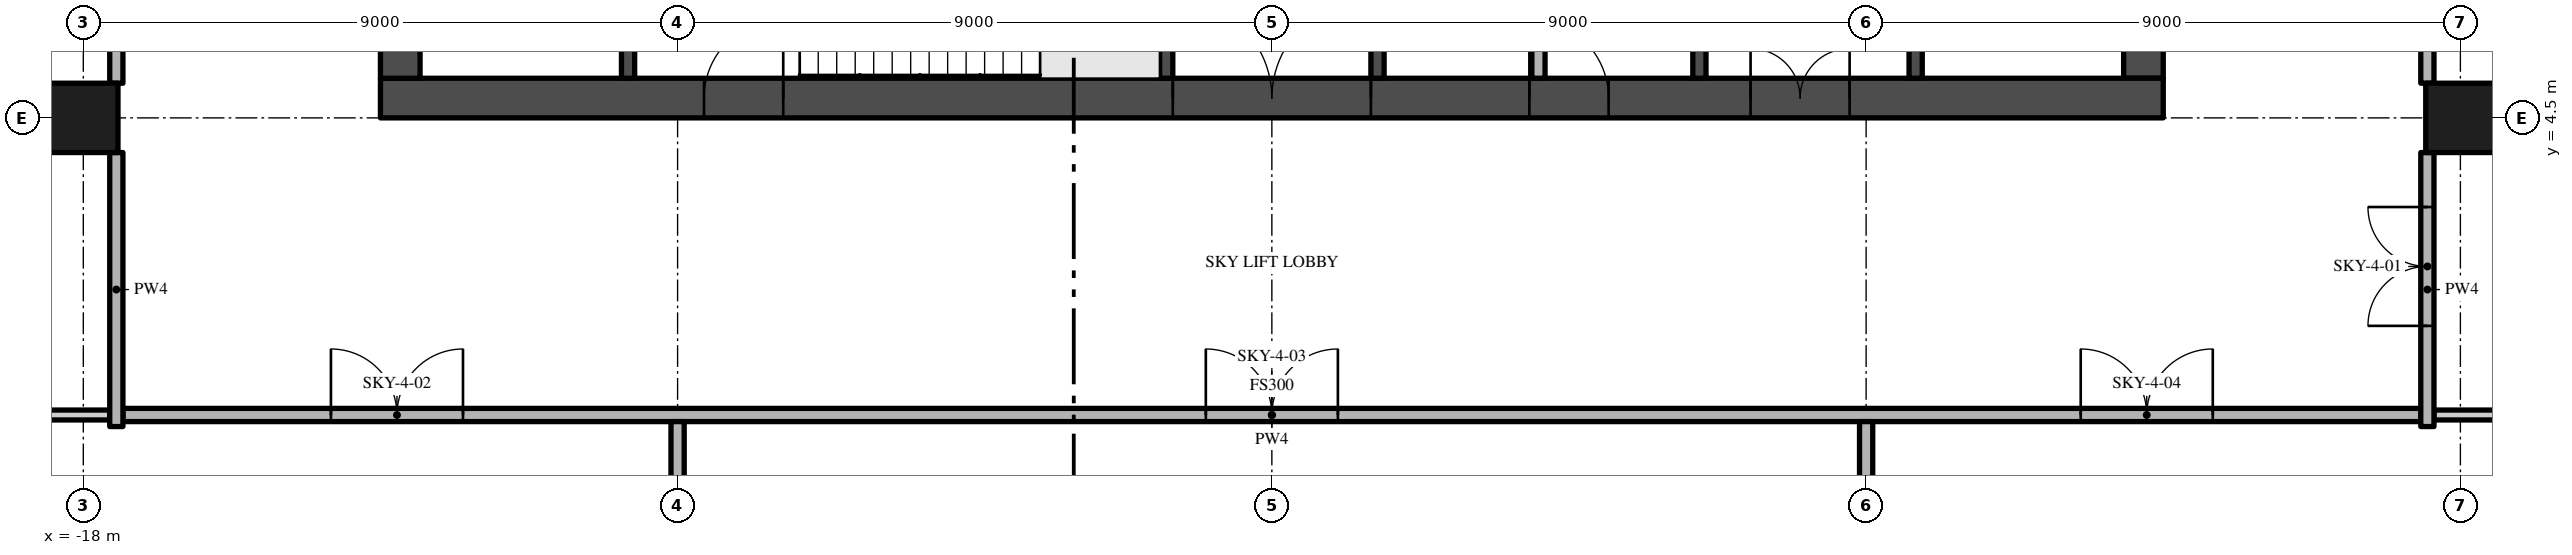
"""IFC4 building model, lengths in metres.
Left out: names, types, materials, properties, quantities, classifications, styles, units other than length and angle.
Written with IfcOpenShell. Run it as: python <this file> out.ifc"""

import sys

from ifc_helpers import new_model, si_unit, direction, frame, frame_2d, origin, origin_2d, place, context, subcontext, project, spatial, rectangle, extrude, element, fill, save


model = new_model("IFC4")
c1 = context("Model", 3, precision=1e-05, world=origin(), true_north=direction((0.0, 1.0)))
c2 = subcontext(c1, "Body", "Model", "MODEL_VIEW")
j1 = project(units=[si_unit("LENGTHUNIT", "METRE"), si_unit("PLANEANGLEUNIT", "RADIAN")], contexts=[c1])
p1 = place(None, origin())
s1 = spatial("IfcSite", under=j1, at=p1, CompositionType="ELEMENT")
p2 = place(p1, origin())
s2 = spatial("IfcBuilding", under=s1, at=p2, CompositionType="ELEMENT")
p3 = place(p2, frame((0.0, 0.0, 233.8)))
s3 = spatial("IfcBuildingStorey", under=s2, at=p3, CompositionType="ELEMENT", Elevation=233.8)
p4 = place(p3, frame((-13.5, 4.8, -0.3), z_axis=(0.0, 0.0, 1.0), x_axis=(1.0, 0.0, 0.0)))
e1 = element("IfcWall", 1, at=p4, inside=s3, PredefinedType="SHEAR", context=c2, shape_type="SweptSolid", body=[
    extrude(rectangle(XDim=27.0, YDim=0.6, at=frame_2d((13.5, 0.0))), origin(), (0.0, 0.0, 1.0), 5.0),
])
p5 = place(p4, frame((12.0, 0.0, 0.3)))
e2 = element("IfcOpeningElement", 2, at=p5, cuts=e1, PredefinedType="OPENING", context=c2, shape_type="SweptSolid", body=[
    extrude(rectangle(XDim=3.0, YDim=2.4, at=frame_2d((1.5, 1.2))), frame((0.0, 0.31, 0.0), z_axis=(0.0, -1.0, 0.0), x_axis=(1.0, 0.0, 0.0)), (0.0, 0.0, 1.0), 0.62),
])
p6 = place(p4, frame((4.9, 0.0, 0.3)))
e3 = element("IfcOpeningElement", 3, at=p6, cuts=e1, PredefinedType="OPENING", context=c2, shape_type="SweptSolid", body=[
    extrude(rectangle(XDim=1.2, YDim=2.2, at=frame_2d((0.6, 1.1))), frame((0.0, 0.31, 0.0), z_axis=(0.0, -1.0, 0.0), x_axis=(1.0, 0.0, 0.0)), (0.0, 0.0, 1.0), 0.62),
])
p7 = place(p4, frame((20.75, 0.0, 0.3)))
e4 = element("IfcOpeningElement", 4, at=p7, cuts=e1, PredefinedType="OPENING", context=c2, shape_type="SweptSolid", body=[
    extrude(rectangle(XDim=1.5, YDim=2.2, at=frame_2d((0.75, 1.1))), frame((0.0, 0.31, 0.0), z_axis=(0.0, -1.0, 0.0), x_axis=(1.0, 0.0, 0.0)), (0.0, 0.0, 1.0), 0.62),
])
p8 = place(p4, frame((17.4, 0.0, 0.3)))
e5 = element("IfcOpeningElement", 5, at=p8, cuts=e1, PredefinedType="OPENING", context=c2, shape_type="SweptSolid", body=[
    extrude(rectangle(XDim=1.2, YDim=2.2, at=frame_2d((0.6, 1.1))), frame((0.0, 0.31, 0.0), z_axis=(0.0, -1.0, 0.0), x_axis=(1.0, 0.0, 0.0)), (0.0, 0.0, 1.0), 0.62),
])
p9 = place(p3, frame((13.2, 5.1, -0.3), z_axis=(0.0, 0.0, 1.0), x_axis=(0.0, 1.0, 0.0)))
e6 = element("IfcWall", 6, at=p9, inside=s3, PredefinedType="SHEAR", context=c2, shape_type="SweptSolid", body=[
    extrude(rectangle(XDim=16.8, YDim=0.6, at=frame_2d((8.4, 0.0))), origin(), (0.0, 0.0, 1.0), 5.0),
])
p10 = place(p9, frame((6.3, 0.0, 0.3)))
e7 = element("IfcOpeningElement", 7, at=p10, cuts=e6, PredefinedType="OPENING", context=c2, shape_type="SweptSolid", body=[
    extrude(rectangle(XDim=1.2, YDim=2.2, at=frame_2d((0.6, 1.1))), frame((0.0, 0.31, 0.0), z_axis=(0.0, -1.0, 0.0), x_axis=(1.0, 0.0, 0.0)), (0.0, 0.0, 1.0), 0.62),
])
p11 = place(p3, frame((-13.2, 21.9, -0.3), z_axis=(0.0, 0.0, 1.0), x_axis=(0.0, -1.0, 0.0)))
e8 = element("IfcWall", 8, at=p11, inside=s3, PredefinedType="SHEAR", context=c2, shape_type="SweptSolid", body=[
    extrude(rectangle(XDim=16.8, YDim=0.6, at=frame_2d((8.4, 0.0))), origin(), (0.0, 0.0, 1.0), 5.0),
])
p12 = place(p11, frame((9.3, 0.0, 0.3)))
e9 = element("IfcOpeningElement", 9, at=p12, cuts=e8, PredefinedType="OPENING", context=c2, shape_type="SweptSolid", body=[
    extrude(rectangle(XDim=1.2, YDim=2.2, at=frame_2d((0.6, 1.1))), frame((0.0, 0.31, 0.0), z_axis=(0.0, -1.0, 0.0), x_axis=(1.0, 0.0, 0.0)), (0.0, 0.0, 1.0), 0.62),
])
for number, where, z_axis, x_axis in (
    (10, (-18.0, 4.5, 0.0), (0.0, 0.0, 1.0), (1.0, 0.0, 0.0)),
    (11, (18.0, 4.5, 0.0), (0.0, 0.0, 1.0), (1.0, 0.0, 0.0)),
):
    element("IfcColumn", number, at=place(p3, frame(where, z_axis=z_axis, x_axis=x_axis)), inside=s3, PredefinedType="COLUMN", context=c2, shape_type="SweptSolid", body=[
        extrude(rectangle(XDim=1.05, YDim=1.05, at=origin_2d()), origin(), (0.0, 0.0, 1.0), 4.7),
    ])
for number, where, z_axis, x_axis in (
    (12, (-9.75, 5.1, 0.0), (0.0, 0.0, 1.0), (0.0, 1.0, 0.0)),
    (13, (-1.6, 5.1, 0.0), (0.0, 0.0, 1.0), (0.0, 1.0, 0.0)),
):
    element("IfcWall", number, at=place(p3, frame(where, z_axis=z_axis, x_axis=x_axis)), inside=s3, PredefinedType="SHEAR", context=c2, shape_type="SweptSolid", body=[
        extrude(rectangle(XDim=2.85, YDim=0.2, at=frame_2d((1.425, 0.0))), origin(), (0.0, 0.0, 1.0), 4.7),
    ])
p13 = place(p3, frame((1.6, 9.8, 0.0), z_axis=(0.0, 0.0, 1.0), x_axis=(0.0, -1.0, 0.0)))
e14 = element("IfcWall", 14, at=p13, inside=s3, PredefinedType="SHEAR", context=c2, shape_type="SweptSolid", body=[
    extrude(rectangle(XDim=4.7, YDim=0.2, at=frame_2d((2.35, 0.0))), origin(), (0.0, 0.0, 1.0), 4.7),
])
p14 = place(p13, frame((1.5, 0.0, 0.0)))
e15 = element("IfcOpeningElement", 15, at=p14, cuts=e14, PredefinedType="OPENING", context=c2, shape_type="SweptSolid", body=[
    extrude(rectangle(XDim=0.9, YDim=2.1, at=frame_2d((0.45, 1.05))), frame((0.0, 0.11, 0.0), z_axis=(0.0, -1.0, 0.0), x_axis=(1.0, 0.0, 0.0)), (0.0, 0.0, 1.0), 0.22),
])
p15 = place(p3, frame((4.037, 9.8, 0.0), z_axis=(0.0, 0.0, 1.0), x_axis=(0.0, -1.0, 0.0)))
e16 = element("IfcWall", 16, at=p15, inside=s3, PredefinedType="PARTITIONING", context=c2, shape_type="SweptSolid", body=[
    extrude(rectangle(XDim=4.7, YDim=0.2, at=frame_2d((2.35, 0.0))), origin(), (0.0, 0.0, 1.0), 4.7),
])
p16 = place(p15, frame((1.9, 0.0, 0.0)))
e17 = element("IfcOpeningElement", 17, at=p16, cuts=e16, PredefinedType="OPENING", context=c2, shape_type="SweptSolid", body=[
    extrude(rectangle(XDim=0.9, YDim=2.1, at=frame_2d((0.45, 1.05))), frame((0.0, 0.11, 0.0), z_axis=(0.0, -1.0, 0.0), x_axis=(1.0, 0.0, 0.0)), (0.0, 0.0, 1.0), 0.22),
])
p17 = place(p3, frame((6.475, 5.1, 0.0), z_axis=(0.0, 0.0, 1.0), x_axis=(0.0, 1.0, 0.0)))
e18 = element("IfcWall", 18, at=p17, inside=s3, PredefinedType="SHEAR", context=c2, shape_type="SweptSolid", body=[
    extrude(rectangle(XDim=4.7, YDim=0.2, at=frame_2d((2.35, 0.0))), origin(), (0.0, 0.0, 1.0), 4.7),
])
p18 = place(p3, frame((9.75, 5.1, 0.0), z_axis=(0.0, 0.0, 1.0), x_axis=(0.0, 1.0, 0.0)))
e19 = element("IfcWall", 19, at=p18, inside=s3, PredefinedType="SHEAR", context=c2, shape_type="SweptSolid", body=[
    extrude(rectangle(XDim=2.5, YDim=0.2, at=frame_2d((1.25, 0.0))), origin(), (0.0, 0.0, 1.0), 4.7),
])
p19 = place(p18, frame((0.85, 0.0, 0.0)))
e20 = element("IfcOpeningElement", 20, at=p19, cuts=e19, PredefinedType="OPENING", context=c2, shape_type="SweptSolid", body=[
    extrude(rectangle(XDim=1.1, YDim=2.1, at=frame_2d((0.55, 1.05))), frame((0.0, 0.11, 0.0), z_axis=(0.0, -1.0, 0.0), x_axis=(1.0, 0.0, 0.0)), (0.0, 0.0, 1.0), 0.22),
])
p20 = place(p3, frame((-17.4, 0.0, 0.0), z_axis=(0.0, 0.0, 1.0), x_axis=(1.0, 0.0, 0.0)))
e21 = element("IfcWall", 21, at=p20, inside=s3, PredefinedType="PARTITIONING", context=c2, shape_type="SweptSolid", body=[
    extrude(rectangle(XDim=34.8, YDim=0.2, at=frame_2d((17.4, 0.0))), origin(), (0.0, 0.0, 1.0), 4.7),
])
p21 = place(p20, frame((3.15, 0.0, 0.0)))
e22 = element("IfcOpeningElement", 22, at=p21, cuts=e21, PredefinedType="OPENING", context=c2, shape_type="SweptSolid", body=[
    extrude(rectangle(XDim=2.0, YDim=2.4, at=frame_2d((1.0, 1.2))), frame((0.0, 0.11, 0.0), z_axis=(0.0, -1.0, 0.0), x_axis=(1.0, 0.0, 0.0)), (0.0, 0.0, 1.0), 0.22),
])
p22 = place(p20, frame((16.4, 0.0, 0.0)))
e23 = element("IfcOpeningElement", 23, at=p22, cuts=e21, PredefinedType="OPENING", context=c2, shape_type="SweptSolid", body=[
    extrude(rectangle(XDim=2.0, YDim=2.4, at=frame_2d((1.0, 1.2))), frame((0.0, 0.11, 0.0), z_axis=(0.0, -1.0, 0.0), x_axis=(1.0, 0.0, 0.0)), (0.0, 0.0, 1.0), 0.22),
])
p23 = place(p20, frame((29.65, 0.0, 0.0)))
e24 = element("IfcOpeningElement", 24, at=p23, cuts=e21, PredefinedType="OPENING", context=c2, shape_type="SweptSolid", body=[
    extrude(rectangle(XDim=2.0, YDim=2.4, at=frame_2d((1.0, 1.2))), frame((0.0, 0.11, 0.0), z_axis=(0.0, -1.0, 0.0), x_axis=(1.0, 0.0, 0.0)), (0.0, 0.0, 1.0), 0.22),
])
for number, where, z_axis, x_axis in (
    (25, (-26.7, 0.0, 0.0), (0.0, 0.0, 1.0), (1.0, 0.0, 0.0)),
    (26, (17.6, 0.0, 0.0), (0.0, 0.0, 1.0), (1.0, 0.0, 0.0)),
):
    element("IfcWall", number, at=place(p3, frame(where, z_axis=z_axis, x_axis=x_axis)), inside=s3, PredefinedType="PARTITIONING", context=c2, shape_type="SweptSolid", body=[
        extrude(rectangle(XDim=9.1, YDim=0.15, at=frame_2d((4.55, 0.0))), origin(), (0.0, 0.0, 1.0), 4.7),
    ])
p24 = place(p3, frame((-17.5, -0.175, 0.0), z_axis=(0.0, 0.0, 1.0), x_axis=(0.0, 1.0, 0.0)))
e27 = element("IfcWall", 27, at=p24, inside=s3, PredefinedType="PARTITIONING", context=c2, shape_type="SweptSolid", body=[
    extrude(rectangle(XDim=4.15, YDim=0.2, at=frame_2d((2.075, 0.0))), origin(), (0.0, 0.0, 1.0), 4.7),
])
p25 = place(p3, frame((-17.5, 12.975, 0.0), z_axis=(0.0, 0.0, 1.0), x_axis=(0.0, -1.0, 0.0)))
e28 = element("IfcWall", 28, at=p25, inside=s3, PredefinedType="PARTITIONING", context=c2, shape_type="SweptSolid", body=[
    extrude(rectangle(XDim=7.95, YDim=0.2, at=frame_2d((3.975, 0.0))), origin(), (0.0, 0.0, 1.0), 4.7),
])
p26 = place(p25, frame((0.15, 0.0, 0.0)))
e29 = element("IfcOpeningElement", 29, at=p26, cuts=e28, PredefinedType="OPENING", context=c2, shape_type="SweptSolid", body=[
    extrude(rectangle(XDim=2.0, YDim=2.4, at=frame_2d((1.0, 1.2))), frame((0.0, 0.11, 0.0), z_axis=(0.0, -1.0, 0.0), x_axis=(1.0, 0.0, 0.0)), (0.0, 0.0, 1.0), 0.22),
])
for number, where, z_axis, x_axis in (
    (30, (-9.0, -3.975, 0.0), (0.0, 0.0, 1.0), (0.0, 1.0, 0.0)),
    (31, (9.0, -3.975, 0.0), (0.0, 0.0, 1.0), (0.0, 1.0, 0.0)),
):
    element("IfcWall", number, at=place(p3, frame(where, z_axis=z_axis, x_axis=x_axis)), inside=s3, PredefinedType="PARTITIONING", context=c2, shape_type="SweptSolid", body=[
        extrude(rectangle(XDim=3.875, YDim=0.2, at=frame_2d((1.938, 0.0))), origin(), (0.0, 0.0, 1.0), 4.7),
    ])
p27 = place(p3, frame((17.5, -0.175, 0.0), z_axis=(0.0, 0.0, 1.0), x_axis=(0.0, 1.0, 0.0)))
e32 = element("IfcWall", 32, at=p27, inside=s3, PredefinedType="PARTITIONING", context=c2, shape_type="SweptSolid", body=[
    extrude(rectangle(XDim=4.15, YDim=0.2, at=frame_2d((2.075, 0.0))), origin(), (0.0, 0.0, 1.0), 4.7),
])
p28 = place(p27, frame((1.525, 0.0, 0.0)))
e33 = element("IfcOpeningElement", 33, at=p28, cuts=e32, PredefinedType="OPENING", context=c2, shape_type="SweptSolid", body=[
    extrude(rectangle(XDim=1.8, YDim=2.4, at=frame_2d((0.9, 1.2))), frame((0.0, 0.11, 0.0), z_axis=(0.0, -1.0, 0.0), x_axis=(1.0, 0.0, 0.0)), (0.0, 0.0, 1.0), 0.22),
])
p29 = place(p3, frame((17.5, 12.975, 0.0), z_axis=(0.0, 0.0, 1.0), x_axis=(0.0, -1.0, 0.0)))
e34 = element("IfcWall", 34, at=p29, inside=s3, PredefinedType="PARTITIONING", context=c2, shape_type="SweptSolid", body=[
    extrude(rectangle(XDim=7.95, YDim=0.2, at=frame_2d((3.975, 0.0))), origin(), (0.0, 0.0, 1.0), 4.7),
])
p30 = place(p29, frame((5.8, 0.0, 0.0)))
e35 = element("IfcOpeningElement", 35, at=p30, cuts=e34, PredefinedType="OPENING", context=c2, shape_type="SweptSolid", body=[
    extrude(rectangle(XDim=0.9, YDim=2.1, at=frame_2d((0.45, 1.05))), frame((0.0, 0.11, 0.0), z_axis=(0.0, -1.0, 0.0), x_axis=(1.0, 0.0, 0.0)), (0.0, 0.0, 1.0), 0.22),
])
p31 = place(p29, frame((1.275, 0.0, 0.0)))
e36 = element("IfcOpeningElement", 36, at=p31, cuts=e34, PredefinedType="OPENING", context=c2, shape_type="SweptSolid", body=[
    extrude(rectangle(XDim=0.9, YDim=2.1, at=frame_2d((0.45, 1.05))), frame((0.0, 0.11, 0.0), z_axis=(0.0, -1.0, 0.0), x_axis=(1.0, 0.0, 0.0)), (0.0, 0.0, 1.0), 0.22),
])
p32 = place(p5, frame((3.0, 0.0, 0.0), z_axis=(0.0, 0.0, 1.0), x_axis=(-1.0, 0.0, 0.0)))
e37 = element("IfcDoor", 37, at=p32, inside=s3, OperationType="DOUBLE_DOOR_SINGLE_SWING", PredefinedType="DOOR", context=c2, shape_type="SweptSolid", body=[
    extrude(rectangle(XDim=3.0, YDim=2.4, at=frame_2d((1.5, 1.2))), frame((0.0, 0.025, 0.0), z_axis=(0.0, -1.0, 0.0), x_axis=(1.0, 0.0, 0.0)), (0.0, 0.0, 1.0), 0.05),
])
fill(e2, e37)
p33 = place(p6, frame((1.2, 0.0, 0.0), z_axis=(0.0, 0.0, 1.0), x_axis=(-1.0, 0.0, 0.0)))
e38 = element("IfcDoor", 38, at=p33, inside=s3, OperationType="SINGLE_SWING_LEFT", PredefinedType="DOOR", context=c2, shape_type="SweptSolid", body=[
    extrude(rectangle(XDim=1.2, YDim=2.2, at=frame_2d((0.6, 1.1))), frame((0.0, 0.025, 0.0), z_axis=(0.0, -1.0, 0.0), x_axis=(1.0, 0.0, 0.0)), (0.0, 0.0, 1.0), 0.05),
])
fill(e3, e38)
p34 = place(p7, frame((1.5, 0.0, 0.0), z_axis=(0.0, 0.0, 1.0), x_axis=(-1.0, 0.0, 0.0)))
e39 = element("IfcDoor", 39, at=p34, inside=s3, OperationType="DOUBLE_DOOR_SINGLE_SWING", PredefinedType="DOOR", context=c2, shape_type="SweptSolid", body=[
    extrude(rectangle(XDim=1.5, YDim=2.2, at=frame_2d((0.75, 1.1))), frame((0.0, 0.025, 0.0), z_axis=(0.0, -1.0, 0.0), x_axis=(1.0, 0.0, 0.0)), (0.0, 0.0, 1.0), 0.05),
])
fill(e4, e39)
p35 = place(p8, frame((1.2, 0.0, 0.0), z_axis=(0.0, 0.0, 1.0), x_axis=(-1.0, 0.0, 0.0)))
e40 = element("IfcDoor", 40, at=p35, inside=s3, OperationType="SINGLE_SWING_RIGHT", PredefinedType="DOOR", context=c2, shape_type="SweptSolid", body=[
    extrude(rectangle(XDim=1.2, YDim=2.2, at=frame_2d((0.6, 1.1))), frame((0.0, 0.025, 0.0), z_axis=(0.0, -1.0, 0.0), x_axis=(1.0, 0.0, 0.0)), (0.0, 0.0, 1.0), 0.05),
])
fill(e5, e40)
p36 = place(p28, origin())
e41 = element("IfcDoor", 41, at=p36, inside=s3, OperationType="DOUBLE_DOOR_SINGLE_SWING", PredefinedType="DOOR", context=c2, shape_type="SweptSolid", body=[
    extrude(rectangle(XDim=1.8, YDim=2.4, at=frame_2d((0.9, 1.2))), frame((0.0, 0.025, 0.0), z_axis=(0.0, -1.0, 0.0), x_axis=(1.0, 0.0, 0.0)), (0.0, 0.0, 1.0), 0.05),
])
fill(e33, e41)
p37 = place(p21, origin())
e42 = element("IfcDoor", 42, at=p37, inside=s3, OperationType="DOUBLE_DOOR_SINGLE_SWING", PredefinedType="DOOR", context=c2, shape_type="SweptSolid", body=[
    extrude(rectangle(XDim=2.0, YDim=2.4, at=frame_2d((1.0, 1.2))), frame((0.0, 0.025, 0.0), z_axis=(0.0, -1.0, 0.0), x_axis=(1.0, 0.0, 0.0)), (0.0, 0.0, 1.0), 0.05),
])
fill(e22, e42)
p38 = place(p22, origin())
e43 = element("IfcDoor", 43, at=p38, inside=s3, OperationType="DOUBLE_DOOR_SINGLE_SWING", PredefinedType="DOOR", context=c2, shape_type="SweptSolid", body=[
    extrude(rectangle(XDim=2.0, YDim=2.4, at=frame_2d((1.0, 1.2))), frame((0.0, 0.025, 0.0), z_axis=(0.0, -1.0, 0.0), x_axis=(1.0, 0.0, 0.0)), (0.0, 0.0, 1.0), 0.05),
])
fill(e23, e43)
p39 = place(p23, origin())
e44 = element("IfcDoor", 44, at=p39, inside=s3, OperationType="DOUBLE_DOOR_SINGLE_SWING", PredefinedType="DOOR", context=c2, shape_type="SweptSolid", body=[
    extrude(rectangle(XDim=2.0, YDim=2.4, at=frame_2d((1.0, 1.2))), frame((0.0, 0.025, 0.0), z_axis=(0.0, -1.0, 0.0), x_axis=(1.0, 0.0, 0.0)), (0.0, 0.0, 1.0), 0.05),
])
fill(e24, e44)
save(model, sys.argv[1])
